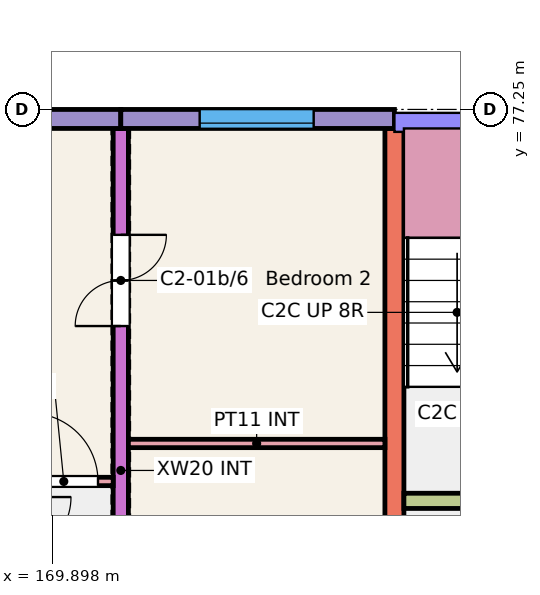
"""IFC4 building model, lengths in metres.
Left out: names, types, materials, properties, quantities, classifications, styles, units other than length and angle.
Written with IfcOpenShell. Run it as: python <this file> out.ifc"""

import sys

from ifc_helpers import new_model, si_unit, direction, frame, frame_2d, origin, place, context, subcontext, project, spatial, rectangle, extrude, element, fill, save


model = new_model("IFC4")
c1 = context("Model", 3, precision=1e-05, world=origin(), true_north=direction((0.0, 1.0)))
c2 = subcontext(c1, "Body", "Model", "MODEL_VIEW")
j1 = project(units=[si_unit("LENGTHUNIT", "METRE"), si_unit("PLANEANGLEUNIT", "RADIAN")], contexts=[c1])
p1 = place(None, origin())
s1 = spatial("IfcSite", under=j1, at=p1, CompositionType="ELEMENT")
p2 = place(p1, origin())
s2 = spatial("IfcBuilding", under=s1, at=p2, CompositionType="ELEMENT")
p3 = place(p2, frame((0.0, 0.0, 3.0)))
s3 = spatial("IfcBuildingStorey", under=s2, at=p3, CompositionType="ELEMENT", Elevation=3.0)
p4 = place(p3, frame((170.8, 68.0, 0.0), z_axis=(0.0, 0.0, 1.0), x_axis=(0.0, 1.0, 0.0)))
e1 = element("IfcWall", 1, at=p4, inside=s3, PredefinedType="SHEAR", context=c2, shape_type="SweptSolid", body=[
    extrude(rectangle(XDim=9.0, YDim=0.2, at=frame_2d((4.5, 0.0))), origin(), (0.0, 0.0, 1.0), 3.0),
])
p5 = place(p4, frame((2.4, 0.0, 0.0)))
e2 = element("IfcOpeningElement", 2, at=p5, cuts=e1, PredefinedType="OPENING", context=c2, shape_type="SweptSolid", body=[
    extrude(rectangle(XDim=1.2, YDim=2.1, at=frame_2d((0.6, 1.05))), frame((0.0, 0.11, 0.0), z_axis=(0.0, -1.0, 0.0), x_axis=(1.0, 0.0, 0.0)), (0.0, 0.0, 1.0), 0.22),
])
p6 = place(p4, frame((6.4, 0.0, 0.0)))
e3 = element("IfcOpeningElement", 3, at=p6, cuts=e1, PredefinedType="OPENING", context=c2, shape_type="SweptSolid", body=[
    extrude(rectangle(XDim=1.2, YDim=2.1, at=frame_2d((0.6, 1.05))), frame((0.0, 0.11, 0.0), z_axis=(0.0, -1.0, 0.0), x_axis=(1.0, 0.0, 0.0)), (0.0, 0.0, 1.0), 0.22),
])
p7 = place(p3, frame((174.4, 68.0, 0.0), z_axis=(0.0, 0.0, 1.0), x_axis=(0.0, 1.0, 0.0)))
e4 = element("IfcWall", 4, at=p7, inside=s3, PredefinedType="SHEAR", context=c2, shape_type="SweptSolid", body=[
    extrude(rectangle(XDim=9.0, YDim=0.25, at=frame_2d((4.5, 0.0))), origin(), (0.0, 0.0, 1.0), 3.0),
])
p8 = place(p3, frame((167.2, 77.125, 0.0), z_axis=(0.0, 0.0, 1.0), x_axis=(1.0, 0.0, 0.0)))
e5 = element("IfcWall", 5, at=p8, inside=s3, PredefinedType="SOLIDWALL", context=c2, shape_type="SweptSolid", body=[
    extrude(rectangle(XDim=3.6, YDim=0.25, at=frame_2d((1.8, 0.0))), origin(), (0.0, 0.0, 1.0), 3.0),
])
p9 = place(p8, frame((1.05, 0.0, 0.9)))
e6 = element("IfcOpeningElement", 6, at=p9, cuts=e5, PredefinedType="OPENING", context=c2, shape_type="SweptSolid", body=[
    extrude(rectangle(XDim=1.5, YDim=1.5, at=frame_2d((0.75, 0.75))), frame((0.0, 0.135, 0.0), z_axis=(0.0, -1.0, 0.0), x_axis=(1.0, 0.0, 0.0)), (0.0, 0.0, 1.0), 0.27),
])
p10 = place(p3, frame((170.8, 77.125, 0.0), z_axis=(0.0, 0.0, 1.0), x_axis=(1.0, 0.0, 0.0)))
e7 = element("IfcWall", 7, at=p10, inside=s3, PredefinedType="SOLIDWALL", context=c2, shape_type="SweptSolid", body=[
    extrude(rectangle(XDim=3.6, YDim=0.25, at=frame_2d((1.8, 0.0))), origin(), (0.0, 0.0, 1.0), 3.0),
])
p11 = place(p10, frame((1.038, 0.0, 0.9)))
e8 = element("IfcOpeningElement", 8, at=p11, cuts=e7, PredefinedType="OPENING", context=c2, shape_type="SweptSolid", body=[
    extrude(rectangle(XDim=1.5, YDim=1.5, at=frame_2d((0.75, 0.75))), frame((0.0, 0.135, 0.0), z_axis=(0.0, -1.0, 0.0), x_axis=(1.0, 0.0, 0.0)), (0.0, 0.0, 1.0), 0.27),
])
p12 = place(p3, frame((174.525, 72.1, 0.0), z_axis=(0.0, 0.0, 1.0), x_axis=(1.0, 0.0, 0.0)))
e9 = element("IfcWall", 9, at=p12, inside=s3, PredefinedType="SHEAR", context=c2, shape_type="SweptSolid", body=[
    extrude(rectangle(XDim=5.725, YDim=0.2, at=frame_2d((2.863, 0.0))), origin(), (0.0, 0.0, 1.0), 3.0),
])
p13 = place(p12, frame((0.95, 0.0, 0.0)))
e10 = element("IfcOpeningElement", 10, at=p13, cuts=e9, PredefinedType="OPENING", context=c2, shape_type="SweptSolid", body=[
    extrude(rectangle(XDim=1.0, YDim=2.1, at=frame_2d((0.5, 1.05))), frame((0.0, 0.11, 0.0), z_axis=(0.0, -1.0, 0.0), x_axis=(1.0, 0.0, 0.0)), (0.0, 0.0, 1.0), 0.22),
])
p14 = place(p12, frame((3.863, 0.0, 0.0)))
e11 = element("IfcOpeningElement", 11, at=p14, cuts=e9, PredefinedType="OPENING", context=c2, shape_type="SweptSolid", body=[
    extrude(rectangle(XDim=1.1, YDim=2.1, at=frame_2d((0.55, 1.05))), frame((0.0, 0.11, 0.0), z_axis=(0.0, -1.0, 0.0), x_axis=(1.0, 0.0, 0.0)), (0.0, 0.0, 1.0), 0.22),
])
p15 = place(p3, frame((167.3, 72.355, 0.0), z_axis=(0.0, 0.0, 1.0), x_axis=(1.0, 0.0, 0.0)))
e12 = element("IfcWall", 12, at=p15, inside=s3, PredefinedType="PARTITIONING", context=c2, shape_type="SweptSolid", body=[
    extrude(rectangle(XDim=3.4, YDim=0.11, at=frame_2d((1.7, 0.0))), origin(), (0.0, 0.0, 1.0), 2.8),
])
p16 = place(p15, frame((2.3, 0.0, 0.0)))
e13 = element("IfcOpeningElement", 13, at=p16, cuts=e12, PredefinedType="OPENING", context=c2, shape_type="SweptSolid", body=[
    extrude(rectangle(XDim=0.9, YDim=2.1, at=frame_2d((0.45, 1.05))), frame((0.0, 0.065, 0.0), z_axis=(0.0, -1.0, 0.0), x_axis=(1.0, 0.0, 0.0)), (0.0, 0.0, 1.0), 0.13),
])
p17 = place(p3, frame((170.9, 72.855, 0.0), z_axis=(0.0, 0.0, 1.0), x_axis=(1.0, 0.0, 0.0)))
e14 = element("IfcWall", 14, at=p17, inside=s3, PredefinedType="PARTITIONING", context=c2, shape_type="SweptSolid", body=[
    extrude(rectangle(XDim=3.375, YDim=0.11, at=frame_2d((1.688, 0.0))), origin(), (0.0, 0.0, 1.0), 2.8),
])
p18 = place(p11, origin())
e15 = element("IfcWindow", 15, at=p18, inside=s3, PartitioningType="SINGLE_PANEL", PredefinedType="WINDOW", context=c2, shape_type="SweptSolid", body=[
    extrude(rectangle(XDim=1.5, YDim=1.5, at=frame_2d((0.75, 0.75))), frame((0.0, -0.025, 0.0), z_axis=(0.0, -1.0, 0.0), x_axis=(1.0, 0.0, 0.0)), (0.0, 0.0, 1.0), 0.06),
])
fill(e8, e15)
p19 = place(p16, origin())
e16 = element("IfcDoor", 16, at=p19, inside=s3, OperationType="SINGLE_SWING_LEFT", PredefinedType="DOOR", context=c2, shape_type="SweptSolid", body=[
    extrude(rectangle(XDim=0.9, YDim=2.1, at=frame_2d((0.45, 1.05))), frame((0.0, 0.025, 0.0), z_axis=(0.0, -1.0, 0.0), x_axis=(1.0, 0.0, 0.0)), (0.0, 0.0, 1.0), 0.05),
])
fill(e13, e16)
p20 = place(p6, origin())
e17 = element("IfcDoor", 17, at=p20, inside=s3, OperationType="DOUBLE_DOOR_SINGLE_SWING", PredefinedType="DOOR", context=c2, shape_type="SweptSolid", body=[
    extrude(rectangle(XDim=1.2, YDim=2.1, at=frame_2d((0.6, 1.05))), frame((0.0, 0.025, 0.0), z_axis=(0.0, -1.0, 0.0), x_axis=(1.0, 0.0, 0.0)), (0.0, 0.0, 1.0), 0.05),
])
fill(e3, e17)
save(model, sys.argv[1])
